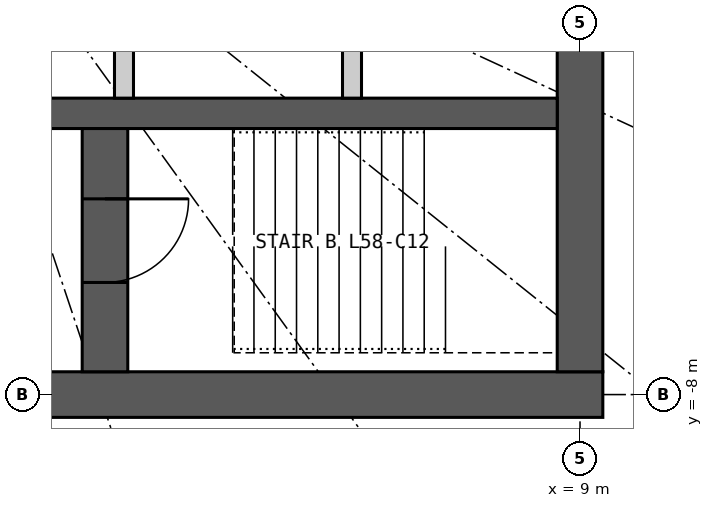
"""IFC4 building model, lengths in metres.
Left out: names, types, materials, properties, quantities, classifications, styles, units other than length and angle.
Written with IfcOpenShell. Run it as: python <this file> out.ifc"""

import sys

from ifc_helpers import new_model, si_unit, direction, frame, frame_2d, origin, place, context, subcontext, project, spatial, rectangle, extrude, element, fill, save


model = new_model("IFC4")
c1 = context("Model", 3, precision=1e-05, world=origin(), true_north=direction((0.0, 1.0)))
c2 = subcontext(c1, "Body", "Model", "MODEL_VIEW")
j1 = project(units=[si_unit("LENGTHUNIT", "METRE"), si_unit("PLANEANGLEUNIT", "RADIAN")], contexts=[c1])
p1 = place(None, origin())
s1 = spatial("IfcSite", under=j1, at=p1, CompositionType="ELEMENT")
p2 = place(p1, origin())
s2 = spatial("IfcBuilding", under=s1, at=p2, CompositionType="ELEMENT")
p3 = place(p2, frame((0.0, 0.0, 216.0)))
s3 = spatial("IfcBuildingStorey", under=s2, at=p3, CompositionType="ELEMENT", Elevation=216.0)
p4 = place(p3, frame((9.3, -8.0, 0.0), z_axis=(0.0, 0.0, 1.0), x_axis=(-1.0, 0.0, 0.0)))
e1 = element("IfcWall", 1, at=p4, inside=s3, PredefinedType="SHEAR", context=c2, shape_type="SweptSolid", body=[
    extrude(rectangle(XDim=18.6, YDim=0.6, at=frame_2d((9.3, 0.0))), origin(), (0.0, 0.0, 1.0), 3.3),
])
p5 = place(p4, frame((8.0, 0.0, 0.0)))
e2 = element("IfcOpeningElement", 2, at=p5, cuts=e1, PredefinedType="OPENING", context=c2, shape_type="SweptSolid", body=[
    extrude(rectangle(XDim=1.2, YDim=2.2, at=frame_2d((0.6, 1.1))), frame((0.0, 0.31, 0.0), z_axis=(0.0, -1.0, 0.0), x_axis=(1.0, 0.0, 0.0)), (0.0, 0.0, 1.0), 0.62),
])
p6 = place(p4, frame((15.6, 0.0, 0.0)))
e3 = element("IfcOpeningElement", 3, at=p6, cuts=e1, PredefinedType="OPENING", context=c2, shape_type="SweptSolid", body=[
    extrude(rectangle(XDim=0.9, YDim=2.2, at=frame_2d((0.45, 1.1))), frame((0.0, 0.31, 0.0), z_axis=(0.0, -1.0, 0.0), x_axis=(1.0, 0.0, 0.0)), (0.0, 0.0, 1.0), 0.62),
])
p7 = place(p3, frame((9.0, -7.7, 0.0), z_axis=(0.0, 0.0, 1.0), x_axis=(0.0, 1.0, 0.0)))
e4 = element("IfcWall", 4, at=p7, inside=s3, PredefinedType="SHEAR", context=c2, shape_type="SweptSolid", body=[
    extrude(rectangle(XDim=15.4, YDim=0.6, at=frame_2d((7.7, 0.0))), origin(), (0.0, 0.0, 1.0), 3.3),
])
p8 = place(p7, frame((6.8, 0.0, 0.0)))
e5 = element("IfcOpeningElement", 5, at=p8, cuts=e4, PredefinedType="OPENING", context=c2, shape_type="SweptSolid", body=[
    extrude(rectangle(XDim=1.8, YDim=2.2, at=frame_2d((0.9, 1.1))), frame((0.0, 0.31, 0.0), z_axis=(0.0, -1.0, 0.0), x_axis=(1.0, 0.0, 0.0)), (0.0, 0.0, 1.0), 0.62),
])
p9 = place(p3, frame((-8.7, -4.3, 0.0), z_axis=(0.0, 0.0, 1.0), x_axis=(1.0, 0.0, 0.0)))
e6 = element("IfcWall", 6, at=p9, inside=s3, PredefinedType="SHEAR", context=c2, shape_type="SweptSolid", body=[
    extrude(rectangle(XDim=17.4, YDim=0.4, at=frame_2d((8.7, 0.0))), origin(), (0.0, 0.0, 1.0), 3.3),
])
p10 = place(p3, frame((2.75, -7.7, 0.0), z_axis=(0.0, 0.0, 1.0), x_axis=(0.0, 1.0, 0.0)))
e7 = element("IfcWall", 7, at=p10, inside=s3, PredefinedType="SHEAR", context=c2, shape_type="SweptSolid", body=[
    extrude(rectangle(XDim=3.2, YDim=0.6, at=frame_2d((1.6, 0.0))), origin(), (0.0, 0.0, 1.0), 3.3),
])
p11 = place(p10, frame((1.175, 0.0, 0.0)))
e8 = element("IfcOpeningElement", 8, at=p11, cuts=e7, PredefinedType="OPENING", context=c2, shape_type="SweptSolid", body=[
    extrude(rectangle(XDim=1.1, YDim=2.2, at=frame_2d((0.55, 1.1))), frame((0.0, 0.31, 0.0), z_axis=(0.0, -1.0, 0.0), x_axis=(1.0, 0.0, 0.0)), (0.0, 0.0, 1.0), 0.62),
])
for number, where, z_axis, x_axis in (
    (9, (3.0, -4.1, 0.0), (0.0, 0.0, 1.0), (0.0, 1.0, 0.0)),
    (10, (6.0, -4.1, 0.0), (0.0, 0.0, 1.0), (0.0, 1.0, 0.0)),
):
    element("IfcWall", number, at=place(p3, frame(where, z_axis=z_axis, x_axis=x_axis)), inside=s3, PredefinedType="PARTITIONING", context=c2, shape_type="SweptSolid", body=[
        extrude(rectangle(XDim=2.35, YDim=0.25, at=frame_2d((1.175, 0.0))), origin(), (0.0, 0.0, 1.0), 3.3),
    ])
p12 = place(p11, origin())
e11 = element("IfcDoor", 11, at=p12, inside=s3, OperationType="SINGLE_SWING_RIGHT", PredefinedType="DOOR", context=c2, shape_type="SweptSolid", body=[
    extrude(rectangle(XDim=1.1, YDim=2.2, at=frame_2d((0.55, 1.1))), frame((0.0, 0.025, 0.0), z_axis=(0.0, -1.0, 0.0), x_axis=(1.0, 0.0, 0.0)), (0.0, 0.0, 1.0), 0.05),
])
fill(e8, e11)
save(model, sys.argv[1])
